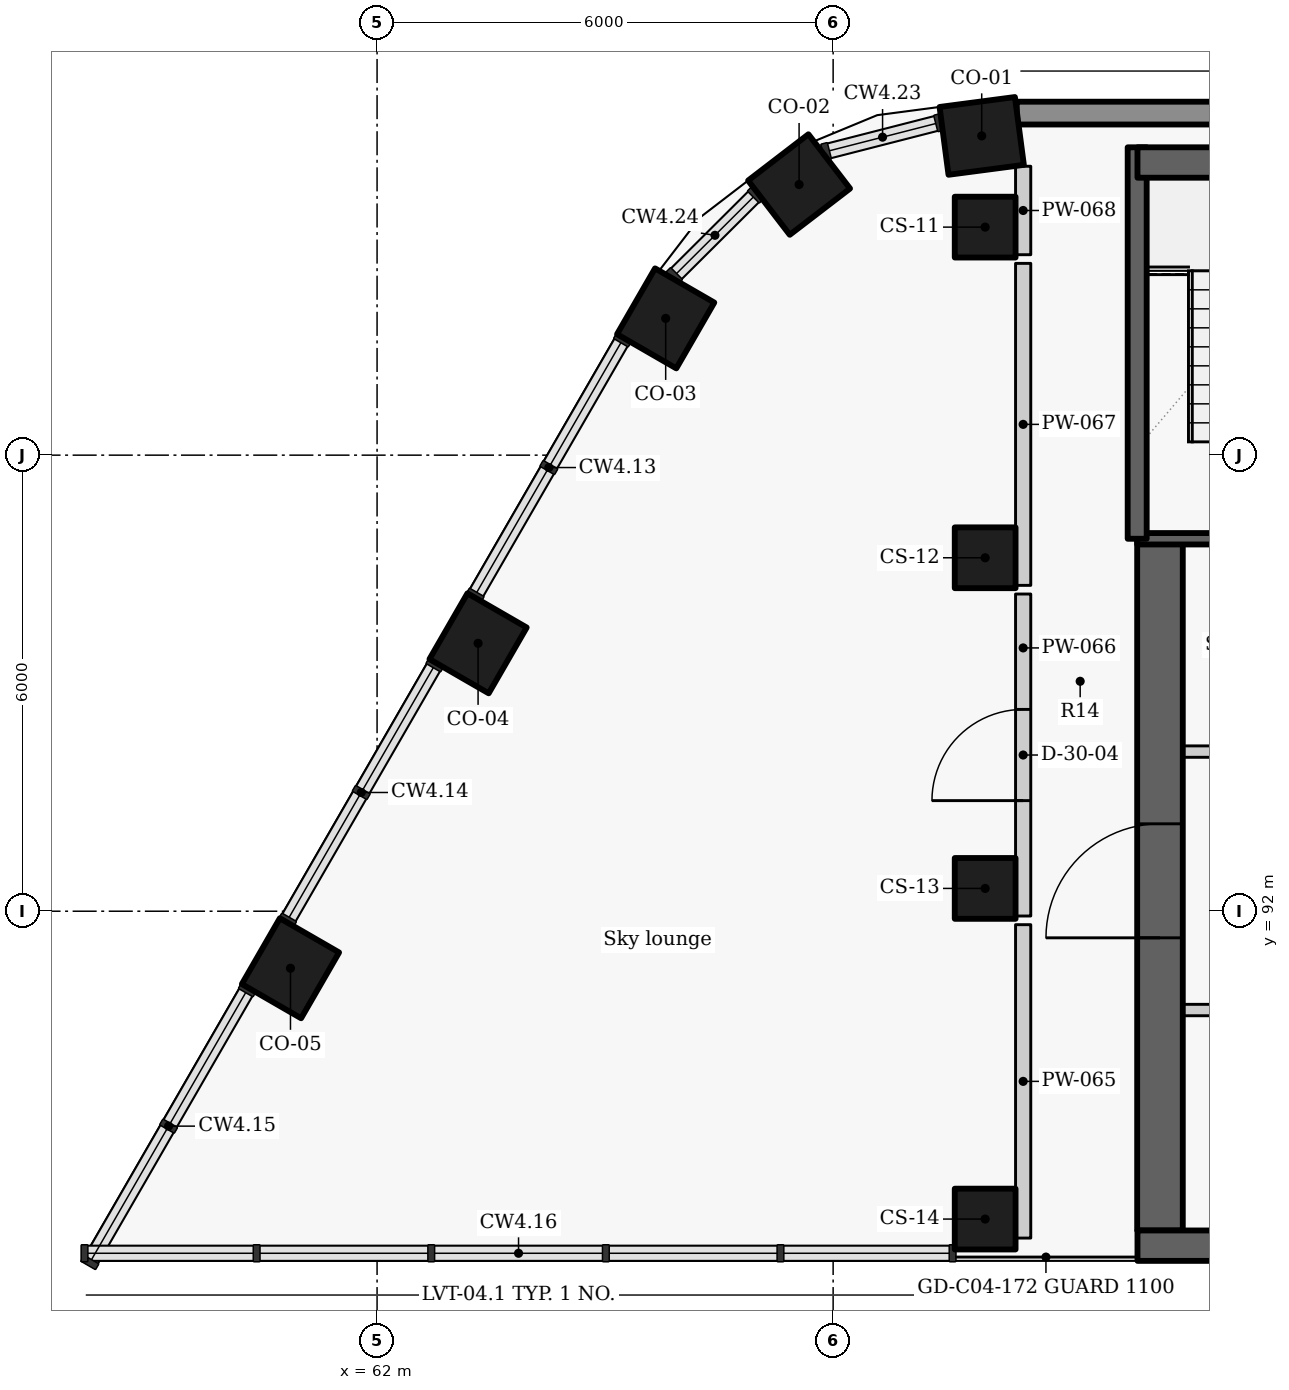
"""IFC4 building model, lengths in metres.
Left out: names, types, materials, properties, quantities, classifications, styles, units other than length and angle.
Written with IfcOpenShell. Run it as: python <this file> out.ifc"""

import sys

from ifc_helpers import new_model, si_unit, direction, frame, frame_2d, origin, origin_2d, place, context, subcontext, project, spatial, rectangle, extrude, element, fill, save


model = new_model("IFC4")
c1 = context("Model", 3, precision=1e-05, world=origin(), true_north=direction((0.0, 1.0)))
c2 = subcontext(c1, "Body", "Model", "MODEL_VIEW")
j1 = project(units=[si_unit("LENGTHUNIT", "METRE"), si_unit("PLANEANGLEUNIT", "RADIAN")], contexts=[c1])
p1 = place(None, origin())
s1 = spatial("IfcSite", under=j1, at=p1, CompositionType="ELEMENT")
p2 = place(p1, origin())
s2 = spatial("IfcBuilding", under=s1, at=p2, CompositionType="ELEMENT")
p3 = place(p2, frame((0.0, 0.0, 283.2)))
s3 = spatial("IfcBuildingStorey", under=s2, at=p3, CompositionType="ELEMENT", Elevation=283.2)
for number, where, z_axis, x_axis in (
    (1, (69.955, 102.2, 0.0), (0.0, 0.0, 1.0), (-0.991, -0.131, 0.0)),
    (2, (67.552, 101.56, 0.0), (0.0, 0.0, 1.0), (-0.793, -0.609, 0.0)),
    (3, (65.797, 99.8, 0.0), (0.0, 0.0, 1.0), (-0.5, -0.866, 0.0)),
    (4, (63.329, 95.525, 0.0), (0.0, 0.0, 1.0), (-0.5, -0.866, 0.0)),
    (5, (60.861, 91.25, 0.0), (0.0, 0.0, 1.0), (-0.5, -0.866, 0.0)),
):
    element("IfcColumn", number, at=place(p3, frame(where, z_axis=z_axis, x_axis=x_axis)), inside=s3, PredefinedType="COLUMN", context=c2, shape_type="SweptSolid", body=[
        extrude(rectangle(XDim=1.0, YDim=0.9, at=origin_2d()), origin(), (0.0, 0.0, 1.0), 3.6),
    ])
for number, where, z_axis, x_axis in (
    (6, (70.0, 101.0, 0.0), (0.0, 0.0, 1.0), (0.0, -1.0, 0.0)),
    (7, (70.0, 96.65, 0.0), (0.0, 0.0, 1.0), (0.0, -1.0, 0.0)),
    (8, (70.0, 92.3, 0.0), (0.0, 0.0, 1.0), (0.0, -1.0, 0.0)),
    (9, (70.0, 87.95, 0.0), (0.0, 0.0, 1.0), (0.0, -1.0, 0.0)),
):
    element("IfcColumn", number, at=place(p3, frame(where, z_axis=z_axis, x_axis=x_axis)), inside=s3, PredefinedType="COLUMN", context=c2, shape_type="SweptSolid", body=[
        extrude(rectangle(XDim=0.8, YDim=0.8, at=origin_2d()), origin(), (0.0, 0.0, 1.0), 3.6),
    ])
p4 = place(p3, frame((89.549, 102.5, 0.0), z_axis=(0.0, 0.0, 1.0), x_axis=(-1.0, 0.0, 0.0)))
e10 = element("IfcWall", 10, at=p4, inside=s3, PredefinedType="SOLIDWALL", context=c2, shape_type="SweptSolid", body=[
    extrude(rectangle(XDim=19.134, YDim=0.3, at=frame_2d((9.567, 0.0))), origin(), (0.0, 0.0, 1.0), 2.725),
])
p5 = place(p3, frame((85.4, 90.7, 0.0), z_axis=(0.0, 0.0, 1.0), x_axis=(-1.0, 0.0, 0.0)))
e11 = element("IfcWall", 11, at=p5, inside=s3, PredefinedType="PARTITIONING", context=c2, shape_type="SweptSolid", body=[
    extrude(rectangle(XDim=13.4, YDim=0.15, at=frame_2d((6.7, 0.0))), origin(), (0.0, 0.0, 1.0), 3.325),
])
p6 = place(p5, frame((11.325, 0.0, 0.0)))
e12 = element("IfcOpeningElement", 12, at=p6, cuts=e11, PredefinedType="OPENING", context=c2, shape_type="SweptSolid", body=[
    extrude(rectangle(XDim=0.9, YDim=2.1, at=frame_2d((0.45, 1.05))), frame((0.0, 0.085, 0.0), z_axis=(0.0, -1.0, 0.0), x_axis=(1.0, 0.0, 0.0)), (0.0, 0.0, 1.0), 0.17),
])
p7 = place(p5, frame((9.0, 0.0, 0.0)))
e13 = element("IfcOpeningElement", 13, at=p7, cuts=e11, PredefinedType="OPENING", context=c2, shape_type="SweptSolid", body=[
    extrude(rectangle(XDim=0.9, YDim=2.1, at=frame_2d((0.45, 1.05))), frame((0.0, 0.085, 0.0), z_axis=(0.0, -1.0, 0.0), x_axis=(1.0, 0.0, 0.0)), (0.0, 0.0, 1.0), 0.17),
])
p8 = place(p5, frame((3.6, 0.0, 0.0)))
e14 = element("IfcOpeningElement", 14, at=p8, cuts=e11, PredefinedType="OPENING", context=c2, shape_type="SweptSolid", body=[
    extrude(rectangle(XDim=0.9, YDim=2.1, at=frame_2d((0.45, 1.05))), frame((0.0, 0.085, 0.0), z_axis=(0.0, -1.0, 0.0), x_axis=(1.0, 0.0, 0.0)), (0.0, 0.0, 1.0), 0.17),
])
p9 = place(p3, frame((72.3, 87.8, -0.275), z_axis=(0.0, 0.0, 1.0), x_axis=(0.0, 1.0, 0.0)))
e15 = element("IfcWall", 15, at=p9, inside=s3, PredefinedType="SHEAR", context=c2, shape_type="SweptSolid", body=[
    extrude(rectangle(XDim=9.1, YDim=0.6, at=frame_2d((4.55, 0.0))), origin(), (0.0, 0.0, 1.0), 3.6),
])
p10 = place(p9, frame((3.85, 0.0, 0.275)))
e16 = element("IfcOpeningElement", 16, at=p10, cuts=e15, PredefinedType="OPENING", context=c2, shape_type="SweptSolid", body=[
    extrude(rectangle(XDim=1.5, YDim=2.1, at=frame_2d((0.75, 1.05))), frame((0.0, 0.31, 0.0), z_axis=(0.0, -1.0, 0.0), x_axis=(1.0, 0.0, 0.0)), (0.0, 0.0, 1.0), 0.62),
])
p11 = place(p3, frame((72.0, 94.1, 0.0), z_axis=(0.0, 0.0, 1.0), x_axis=(1.0, 0.0, 0.0)))
e17 = element("IfcWall", 17, at=p11, inside=s3, PredefinedType="PARTITIONING", context=c2, shape_type="SweptSolid", body=[
    extrude(rectangle(XDim=10.703, YDim=0.15, at=frame_2d((5.352, 0.0))), origin(), (0.0, 0.0, 1.0), 3.325),
])
p12 = place(p11, frame((1.075, 0.0, 0.0)))
e18 = element("IfcOpeningElement", 18, at=p12, cuts=e17, PredefinedType="OPENING", context=c2, shape_type="SweptSolid", body=[
    extrude(rectangle(XDim=1.1, YDim=2.1, at=frame_2d((0.55, 1.05))), frame((0.0, 0.085, 0.0), z_axis=(0.0, -1.0, 0.0), x_axis=(1.0, 0.0, 0.0)), (0.0, 0.0, 1.0), 0.17),
])
p13 = place(p11, frame((2.825, 0.0, 0.0)))
e19 = element("IfcOpeningElement", 19, at=p13, cuts=e17, PredefinedType="OPENING", context=c2, shape_type="SweptSolid", body=[
    extrude(rectangle(XDim=0.9, YDim=2.1, at=frame_2d((0.45, 1.05))), frame((0.0, 0.085, 0.0), z_axis=(0.0, -1.0, 0.0), x_axis=(1.0, 0.0, 0.0)), (0.0, 0.0, 1.0), 0.17),
])
p14 = place(p11, frame((4.175, 0.0, 0.0)))
e20 = element("IfcOpeningElement", 20, at=p14, cuts=e17, PredefinedType="OPENING", context=c2, shape_type="SweptSolid", body=[
    extrude(rectangle(XDim=0.9, YDim=2.1, at=frame_2d((0.45, 1.05))), frame((0.0, 0.085, 0.0), z_axis=(0.0, -1.0, 0.0), x_axis=(1.0, 0.0, 0.0)), (0.0, 0.0, 1.0), 0.17),
])
p15 = place(p11, frame((6.05, 0.0, 0.0)))
e21 = element("IfcOpeningElement", 21, at=p15, cuts=e17, PredefinedType="OPENING", context=c2, shape_type="SweptSolid", body=[
    extrude(rectangle(XDim=1.2, YDim=2.1, at=frame_2d((0.6, 1.05))), frame((0.0, 0.085, 0.0), z_axis=(0.0, -1.0, 0.0), x_axis=(1.0, 0.0, 0.0)), (0.0, 0.0, 1.0), 0.17),
])
p16 = place(p11, frame((8.9, 0.0, 0.0)))
e22 = element("IfcOpeningElement", 22, at=p16, cuts=e17, PredefinedType="OPENING", context=c2, shape_type="SweptSolid", body=[
    extrude(rectangle(XDim=0.9, YDim=2.1, at=frame_2d((0.45, 1.05))), frame((0.0, 0.085, 0.0), z_axis=(0.0, -1.0, 0.0), x_axis=(1.0, 0.0, 0.0)), (0.0, 0.0, 1.0), 0.17),
])
p17 = place(p3, frame((74.6, 96.9, -0.275), z_axis=(0.0, 0.0, 1.0), x_axis=(-1.0, 0.0, 0.0)))
e23 = element("IfcWall", 23, at=p17, inside=s3, PredefinedType="SHEAR", context=c2, shape_type="SweptSolid", body=[
    extrude(rectangle(XDim=2.6, YDim=0.15, at=frame_2d((1.3, 0.0))), origin(), (0.0, 0.0, 1.0), 3.6),
])
p18 = place(p17, frame((0.37, 0.0, 0.275)))
e24 = element("IfcOpeningElement", 24, at=p18, cuts=e23, PredefinedType="OPENING", context=c2, shape_type="SweptSolid", body=[
    extrude(rectangle(XDim=1.1, YDim=2.1, at=frame_2d((0.55, 1.05))), frame((0.0, 0.085, 0.0), z_axis=(0.0, -1.0, 0.0), x_axis=(1.0, 0.0, 0.0)), (0.0, 0.0, 1.0), 0.17),
])
p19 = place(p3, frame((72.0, 96.9, -0.275), z_axis=(0.0, 0.0, 1.0), x_axis=(0.0, 1.0, 0.0)))
e25 = element("IfcWall", 25, at=p19, inside=s3, PredefinedType="SHEAR", context=c2, shape_type="SweptSolid", body=[
    extrude(rectangle(XDim=5.15, YDim=0.25, at=frame_2d((2.575, 0.0))), origin(), (0.0, 0.0, 1.0), 3.6),
])
p20 = place(p3, frame((70.5, 87.7, 0.0), z_axis=(0.0, 0.0, 1.0), x_axis=(0.0, 1.0, 0.0)))
e26 = element("IfcWall", 26, at=p20, inside=s3, PredefinedType="PARTITIONING", context=c2, shape_type="SweptSolid", body=[
    extrude(rectangle(XDim=4.123, YDim=0.2, at=frame_2d((2.062, 0.0))), origin(), (0.0, 0.0, 1.0), 3.325),
])
p21 = place(p3, frame((70.5, 91.937, 0.0), z_axis=(0.0, 0.0, 1.0), x_axis=(0.0, 1.0, 0.0)))
e27 = element("IfcWall", 27, at=p21, inside=s3, PredefinedType="PARTITIONING", context=c2, shape_type="SweptSolid", body=[
    extrude(rectangle(XDim=4.236, YDim=0.2, at=frame_2d((2.118, 0.0))), origin(), (0.0, 0.0, 1.0), 3.325),
])
p22 = place(p21, frame((1.518, 0.0, 0.0)))
e28 = element("IfcOpeningElement", 28, at=p22, cuts=e27, PredefinedType="OPENING", context=c2, shape_type="SweptSolid", body=[
    extrude(rectangle(XDim=1.2, YDim=2.1, at=frame_2d((0.6, 1.05))), frame((0.0, 0.11, 0.0), z_axis=(0.0, -1.0, 0.0), x_axis=(1.0, 0.0, 0.0)), (0.0, 0.0, 1.0), 0.22),
])
p23 = place(p3, frame((70.5, 96.287, 0.0), z_axis=(0.0, 0.0, 1.0), x_axis=(0.0, 1.0, 0.0)))
e29 = element("IfcWall", 29, at=p23, inside=s3, PredefinedType="PARTITIONING", context=c2, shape_type="SweptSolid", body=[
    extrude(rectangle(XDim=4.236, YDim=0.2, at=frame_2d((2.118, 0.0))), origin(), (0.0, 0.0, 1.0), 3.325),
])
p24 = place(p3, frame((70.5, 100.637, 0.0), z_axis=(0.0, 0.0, 1.0), x_axis=(0.0, 1.0, 0.0)))
e30 = element("IfcWall", 30, at=p24, inside=s3, PredefinedType="PARTITIONING", context=c2, shape_type="SweptSolid", body=[
    extrude(rectangle(XDim=1.164, YDim=0.2, at=frame_2d((0.582, 0.0))), origin(), (0.0, 0.0, 1.0), 3.325),
])
p25 = place(p3, frame((72.004, 87.6, -0.275), z_axis=(0.0, 0.0, 1.0), x_axis=(1.0, 0.0, 0.0)))
e31 = element("IfcWall", 31, at=p25, inside=s3, PredefinedType="SHEAR", context=c2, shape_type="SweptSolid", body=[
    extrude(rectangle(XDim=13.396, YDim=0.4, at=frame_2d((6.698, 0.0))), origin(), (0.0, 0.0, 1.0), 3.6),
])
p26 = place(p3, frame((72.004, 101.85, -0.275), z_axis=(0.0, 0.0, 1.0), x_axis=(1.0, 0.0, 0.0)))
e32 = element("IfcWall", 32, at=p26, inside=s3, PredefinedType="SHEAR", context=c2, shape_type="SweptSolid", body=[
    extrude(rectangle(XDim=15.992, YDim=0.4, at=frame_2d((7.996, 0.0))), origin(), (0.0, 0.0, 1.0), 3.6),
])
p27 = place(p22, origin())
e33 = element("IfcDoor", 33, at=p27, inside=s3, OperationType="SINGLE_SWING_LEFT", PredefinedType="DOOR", context=c2, shape_type="SweptSolid", body=[
    extrude(rectangle(XDim=1.2, YDim=2.1, at=frame_2d((0.6, 1.05))), frame((0.0, 0.025, 0.0), z_axis=(0.0, -1.0, 0.0), x_axis=(1.0, 0.0, 0.0)), (0.0, 0.0, 1.0), 0.05),
])
fill(e28, e33)
p28 = place(p10, origin())
e34 = element("IfcDoor", 34, at=p28, inside=s3, OperationType="DOUBLE_DOOR_SINGLE_SWING", PredefinedType="DOOR", context=c2, shape_type="SweptSolid", body=[
    extrude(rectangle(XDim=1.5, YDim=2.1, at=frame_2d((0.75, 1.05))), frame((0.0, 0.025, 0.0), z_axis=(0.0, -1.0, 0.0), x_axis=(1.0, 0.0, 0.0)), (0.0, 0.0, 1.0), 0.05),
])
fill(e16, e34)
save(model, sys.argv[1])
